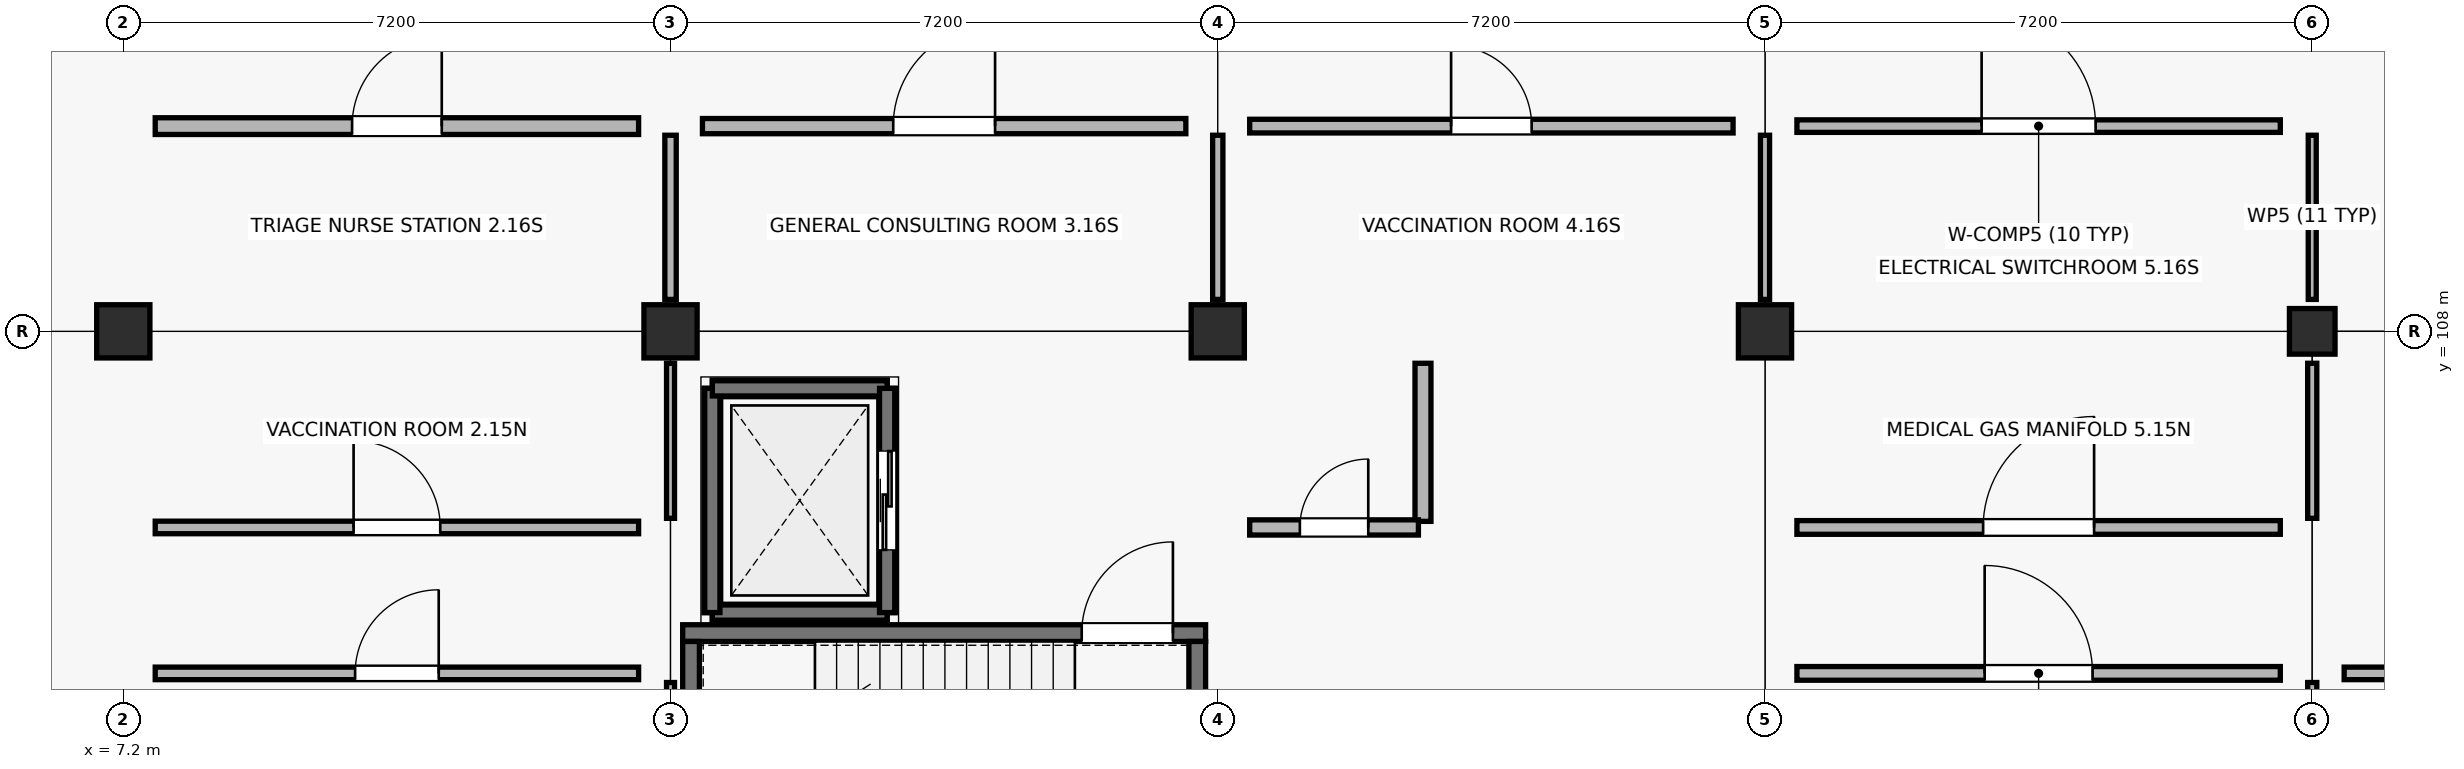
"""IFC4 building model, lengths in metres.
Left out: names, types, materials, properties, quantities, classifications, styles, units other than length and angle.
Written with IfcOpenShell. Run it as: python <this file> out.ifc"""

import sys

from ifc_helpers import new_model, si_unit, direction, frame, frame_2d, origin, origin_2d, place, context, subcontext, project, spatial, rectangle, extrude, element, fill, save


model = new_model("IFC4")
c1 = context("Model", 3, precision=1e-05, world=origin(), true_north=direction((0.0, 1.0)))
c2 = subcontext(c1, "Body", "Model", "MODEL_VIEW")
j1 = project(units=[si_unit("LENGTHUNIT", "METRE"), si_unit("PLANEANGLEUNIT", "RADIAN")], contexts=[c1])
p1 = place(None, origin())
s1 = spatial("IfcSite", under=j1, at=p1, CompositionType="ELEMENT")
p2 = place(p1, origin())
s2 = spatial("IfcBuilding", under=s1, at=p2, CompositionType="ELEMENT")
p3 = place(p2, origin())
s3 = spatial("IfcBuildingStorey", under=s2, at=p3, CompositionType="ELEMENT", Elevation=0.0)
for number, where, z_axis, x_axis in (
    (1, (7.2, 108.0, -0.25), (0.0, 0.0, 1.0), (1.0, 0.0, 0.0)),
    (2, (14.4, 108.0, -0.25), (0.0, 0.0, 1.0), (1.0, 0.0, 0.0)),
    (3, (21.6, 108.0, -0.25), (0.0, 0.0, 1.0), (1.0, 0.0, 0.0)),
    (4, (28.8, 108.0, -0.25), (0.0, 0.0, 1.0), (1.0, 0.0, 0.0)),
):
    element("IfcColumn", number, at=place(p3, frame(where, z_axis=z_axis, x_axis=x_axis)), inside=s3, PredefinedType="COLUMN", context=c2, shape_type="SweptSolid", body=[
        extrude(rectangle(XDim=0.7, YDim=0.7, at=origin_2d()), origin(), (0.0, 0.0, 1.0), 4.75),
    ])
p4 = place(p3, frame((36.0, 108.0, -0.25), z_axis=(0.0, 0.0, 1.0), x_axis=(1.0, 0.0, 0.0)))
e5 = element("IfcColumn", 5, at=p4, inside=s3, PredefinedType="COLUMN", context=c2, shape_type="SweptSolid", body=[
    extrude(rectangle(XDim=0.6, YDim=0.6, at=origin_2d()), origin(), (0.0, 0.0, 1.0), 4.75),
])
p5 = place(p3, frame((14.95, 104.3, -0.95), z_axis=(0.0, 0.0, 1.0), x_axis=(1.0, 0.0, 0.0)))
e6 = element("IfcWall", 6, at=p5, inside=s3, PredefinedType="SHEAR", context=c2, shape_type="SweptSolid", body=[
    extrude(rectangle(XDim=2.3, YDim=0.22, at=frame_2d((1.15, 0.0))), origin(), (0.0, 0.0, 1.0), 0.95),
])
p6 = place(p3, frame((17.25, 104.3, -0.95), z_axis=(0.0, 0.0, 1.0), x_axis=(0.0, 1.0, 0.0)))
e7 = element("IfcWall", 7, at=p6, inside=s3, PredefinedType="SHEAR", context=c2, shape_type="SweptSolid", body=[
    extrude(rectangle(XDim=2.95, YDim=0.22, at=frame_2d((1.475, 0.0))), origin(), (0.0, 0.0, 1.0), 0.95),
])
p7 = place(p3, frame((17.25, 107.25, -0.95), z_axis=(0.0, 0.0, 1.0), x_axis=(-1.0, 0.0, 0.0)))
e8 = element("IfcWall", 8, at=p7, inside=s3, PredefinedType="SHEAR", context=c2, shape_type="SweptSolid", body=[
    extrude(rectangle(XDim=2.3, YDim=0.22, at=frame_2d((1.15, 0.0))), origin(), (0.0, 0.0, 1.0), 0.95),
])
p8 = place(p3, frame((14.95, 107.25, -0.95), z_axis=(0.0, 0.0, 1.0), x_axis=(0.0, -1.0, 0.0)))
e9 = element("IfcWall", 9, at=p8, inside=s3, PredefinedType="SHEAR", context=c2, shape_type="SweptSolid", body=[
    extrude(rectangle(XDim=2.95, YDim=0.22, at=frame_2d((1.475, 0.0))), origin(), (0.0, 0.0, 1.0), 0.95),
])
p9 = place(p3, frame((14.56, 104.03, -0.25), z_axis=(0.0, 0.0, 1.0), x_axis=(1.0, 0.0, 0.0)))
e10 = element("IfcWall", 10, at=p9, inside=s3, PredefinedType="SHEAR", context=c2, shape_type="SweptSolid", body=[
    extrude(rectangle(XDim=6.88, YDim=0.22, at=frame_2d((3.44, 0.0))), origin(), (0.0, 0.0, 1.0), 4.47),
])
p10 = place(p9, frame((5.25, 0.0, 0.25)))
e11 = element("IfcOpeningElement", 11, at=p10, cuts=e10, PredefinedType="OPENING", context=c2, shape_type="SweptSolid", body=[
    extrude(rectangle(XDim=1.2, YDim=2.15, at=frame_2d((0.6, 1.075))), frame((0.0, 0.12, 0.0), z_axis=(0.0, -1.0, 0.0), x_axis=(1.0, 0.0, 0.0)), (0.0, 0.0, 1.0), 0.24),
])
for number, where, z_axis, x_axis in (
    (12, (14.67, 100.92, -0.25), (0.0, 0.0, 1.0), (0.0, 1.0, 0.0)),
    (13, (21.33, 100.92, -0.25), (0.0, 0.0, 1.0), (0.0, 1.0, 0.0)),
):
    element("IfcWall", number, at=place(p3, frame(where, z_axis=z_axis, x_axis=x_axis)), inside=s3, PredefinedType="SHEAR", context=c2, shape_type="SweptSolid", body=[
        extrude(rectangle(XDim=3.0, YDim=0.22, at=frame_2d((1.5, 0.0))), origin(), (0.0, 0.0, 1.0), 4.47),
    ])
p11 = place(p3, frame((14.95, 104.3, 0.0), z_axis=(0.0, 0.0, 1.0), x_axis=(1.0, 0.0, 0.0)))
e14 = element("IfcWall", 14, at=p11, inside=s3, PredefinedType="SHEAR", context=c2, shape_type="SweptSolid", body=[
    extrude(rectangle(XDim=2.3, YDim=0.2, at=frame_2d((1.15, 0.0))), origin(), (0.0, 0.0, 1.0), 4.22),
])
p12 = place(p3, frame((14.95, 104.3, 0.0), z_axis=(0.0, 0.0, 1.0), x_axis=(0.0, 1.0, 0.0)))
e15 = element("IfcWall", 15, at=p12, inside=s3, PredefinedType="SHEAR", context=c2, shape_type="SweptSolid", body=[
    extrude(rectangle(XDim=2.95, YDim=0.2, at=frame_2d((1.475, 0.0))), origin(), (0.0, 0.0, 1.0), 4.22),
])
p13 = place(p3, frame((14.95, 107.25, 0.0), z_axis=(0.0, 0.0, 1.0), x_axis=(1.0, 0.0, 0.0)))
e16 = element("IfcWall", 16, at=p13, inside=s3, PredefinedType="SHEAR", context=c2, shape_type="SweptSolid", body=[
    extrude(rectangle(XDim=2.3, YDim=0.2, at=frame_2d((1.15, 0.0))), origin(), (0.0, 0.0, 1.0), 4.22),
])
p14 = place(p3, frame((17.25, 104.3, 0.0), z_axis=(0.0, 0.0, 1.0), x_axis=(0.0, 1.0, 0.0)))
e17 = element("IfcWall", 17, at=p14, inside=s3, PredefinedType="SHEAR", context=c2, shape_type="SweptSolid", body=[
    extrude(rectangle(XDim=2.95, YDim=0.2, at=frame_2d((1.475, 0.0))), origin(), (0.0, 0.0, 1.0), 4.22),
])
p15 = place(p14, frame((0.825, 0.0, 0.0)))
e18 = element("IfcOpeningElement", 18, at=p15, cuts=e17, PredefinedType="OPENING", context=c2, shape_type="SweptSolid", body=[
    extrude(rectangle(XDim=1.3, YDim=2.15, at=frame_2d((0.65, 1.075))), frame((0.0, 0.11, 0.0), z_axis=(0.0, -1.0, 0.0), x_axis=(1.0, 0.0, 0.0)), (0.0, 0.0, 1.0), 0.22),
])
p16 = place(p3, frame((29.22, 103.5, 0.0), z_axis=(0.0, 0.0, 1.0), x_axis=(1.0, 0.0, 0.0)))
e19 = element("IfcWall", 19, at=p16, inside=s3, PredefinedType="PARTITIONING", context=c2, shape_type="SweptSolid", body=[
    extrude(rectangle(XDim=6.36, YDim=0.18, at=frame_2d((3.18, 0.0))), origin(), (0.0, 0.0, 1.0), 3.36),
])
p17 = place(p16, frame((2.47, 0.0, 0.0)))
e20 = element("IfcOpeningElement", 20, at=p17, cuts=e19, PredefinedType="OPENING", context=c2, shape_type="SweptSolid", body=[
    extrude(rectangle(XDim=1.42, YDim=2.09, at=frame_2d((0.71, 1.045))), frame((0.0, 0.1, 0.0), z_axis=(0.0, -1.0, 0.0), x_axis=(1.0, 0.0, 0.0)), (0.0, 0.0, 1.0), 0.2),
])
p18 = place(p3, frame((36.0, 101.22, 0.0), z_axis=(0.0, 0.0, 1.0), x_axis=(0.0, 1.0, 0.0)))
e21 = element("IfcWall", 21, at=p18, inside=s3, PredefinedType="PARTITIONING", context=c2, shape_type="SweptSolid", body=[
    extrude(rectangle(XDim=2.16, YDim=0.12, at=frame_2d((1.08, 0.0))), origin(), (0.0, 0.0, 1.0), 3.36),
])
p19 = place(p3, frame((29.22, 105.42, 0.0), z_axis=(0.0, 0.0, 1.0), x_axis=(1.0, 0.0, 0.0)))
e22 = element("IfcWall", 22, at=p19, inside=s3, PredefinedType="PARTITIONING", context=c2, shape_type="SweptSolid", body=[
    extrude(rectangle(XDim=6.36, YDim=0.18, at=frame_2d((3.18, 0.0))), origin(), (0.0, 0.0, 1.0), 3.36),
])
p20 = place(p19, frame((2.45, 0.0, 0.0)))
e23 = element("IfcOpeningElement", 23, at=p20, cuts=e22, PredefinedType="OPENING", context=c2, shape_type="SweptSolid", body=[
    extrude(rectangle(XDim=1.46, YDim=2.09, at=frame_2d((0.73, 1.045))), frame((0.0, 0.1, 0.0), z_axis=(0.0, -1.0, 0.0), x_axis=(1.0, 0.0, 0.0)), (0.0, 0.0, 1.0), 0.2),
])
p21 = place(p3, frame((36.0, 105.54, 0.0), z_axis=(0.0, 0.0, 1.0), x_axis=(0.0, 1.0, 0.0)))
e24 = element("IfcWall", 24, at=p21, inside=s3, PredefinedType="PARTITIONING", context=c2, shape_type="SweptSolid", body=[
    extrude(rectangle(XDim=2.04, YDim=0.12, at=frame_2d((1.02, 0.0))), origin(), (0.0, 0.0, 1.0), 3.36),
])
p22 = place(p3, frame((29.22, 110.7, 0.0), z_axis=(0.0, 0.0, 1.0), x_axis=(1.0, 0.0, 0.0)))
e25 = element("IfcWall", 25, at=p22, inside=s3, PredefinedType="PARTITIONING", context=c2, shape_type="SweptSolid", body=[
    extrude(rectangle(XDim=6.36, YDim=0.165, at=frame_2d((3.18, 0.0))), origin(), (0.0, 0.0, 1.0), 3.36),
])
p23 = place(p22, frame((2.43, 0.0, 0.0)))
e26 = element("IfcOpeningElement", 26, at=p23, cuts=e25, PredefinedType="OPENING", context=c2, shape_type="SweptSolid", body=[
    extrude(rectangle(XDim=1.5, YDim=2.09, at=frame_2d((0.75, 1.045))), frame((0.0, 0.093, 0.0), z_axis=(0.0, -1.0, 0.0), x_axis=(1.0, 0.0, 0.0)), (0.0, 0.0, 1.0), 0.185),
])
p24 = place(p3, frame((36.0, 108.42, 0.0), z_axis=(0.0, 0.0, 1.0), x_axis=(0.0, 1.0, 0.0)))
e27 = element("IfcWall", 27, at=p24, inside=s3, PredefinedType="PARTITIONING", context=c2, shape_type="SweptSolid", body=[
    extrude(rectangle(XDim=2.16, YDim=0.105, at=frame_2d((1.08, 0.0))), origin(), (0.0, 0.0, 1.0), 3.36),
])
p25 = place(p3, frame((36.42, 103.5, 0.0), z_axis=(0.0, 0.0, 1.0), x_axis=(1.0, 0.0, 0.0)))
e28 = element("IfcWall", 28, at=p25, inside=s3, PredefinedType="PARTITIONING", context=c2, shape_type="SweptSolid", body=[
    extrude(rectangle(XDim=6.36, YDim=0.165, at=frame_2d((3.18, 0.0))), origin(), (0.0, 0.0, 1.0), 3.36),
])
p26 = place(p25, frame((2.63, 0.0, 0.0)))
e29 = element("IfcOpeningElement", 29, at=p26, cuts=e28, PredefinedType="OPENING", context=c2, shape_type="SweptSolid", body=[
    extrude(rectangle(XDim=1.1, YDim=2.14, at=frame_2d((0.55, 1.07))), frame((0.0, 0.093, 0.0), z_axis=(0.0, -1.0, 0.0), x_axis=(1.0, 0.0, 0.0)), (0.0, 0.0, 1.0), 0.185),
])
p27 = place(p3, frame((7.62, 103.5, 0.0), z_axis=(0.0, 0.0, 1.0), x_axis=(1.0, 0.0, 0.0)))
e30 = element("IfcWall", 30, at=p27, inside=s3, PredefinedType="PARTITIONING", context=c2, shape_type="SweptSolid", body=[
    extrude(rectangle(XDim=6.36, YDim=0.165, at=frame_2d((3.18, 0.0))), origin(), (0.0, 0.0, 1.0), 3.36),
])
p28 = place(p27, frame((2.63, 0.0, 0.0)))
e31 = element("IfcOpeningElement", 31, at=p28, cuts=e30, PredefinedType="OPENING", context=c2, shape_type="SweptSolid", body=[
    extrude(rectangle(XDim=1.1, YDim=2.09, at=frame_2d((0.55, 1.045))), frame((0.0, 0.093, 0.0), z_axis=(0.0, -1.0, 0.0), x_axis=(1.0, 0.0, 0.0)), (0.0, 0.0, 1.0), 0.185),
])
p29 = place(p3, frame((14.4, 101.22, 0.0), z_axis=(0.0, 0.0, 1.0), x_axis=(0.0, 1.0, 0.0)))
e32 = element("IfcWall", 32, at=p29, inside=s3, PredefinedType="PARTITIONING", context=c2, shape_type="SweptSolid", body=[
    extrude(rectangle(XDim=2.16, YDim=0.105, at=frame_2d((1.08, 0.0))), origin(), (0.0, 0.0, 1.0), 3.36),
])
p30 = place(p3, frame((7.62, 105.42, 0.0), z_axis=(0.0, 0.0, 1.0), x_axis=(1.0, 0.0, 0.0)))
e33 = element("IfcWall", 33, at=p30, inside=s3, PredefinedType="PARTITIONING", context=c2, shape_type="SweptSolid", body=[
    extrude(rectangle(XDim=6.36, YDim=0.165, at=frame_2d((3.18, 0.0))), origin(), (0.0, 0.0, 1.0), 3.36),
])
p31 = place(p30, frame((2.61, 0.0, 0.0)))
e34 = element("IfcOpeningElement", 34, at=p31, cuts=e33, PredefinedType="OPENING", context=c2, shape_type="SweptSolid", body=[
    extrude(rectangle(XDim=1.14, YDim=2.09, at=frame_2d((0.57, 1.045))), frame((0.0, 0.093, 0.0), z_axis=(0.0, -1.0, 0.0), x_axis=(1.0, 0.0, 0.0)), (0.0, 0.0, 1.0), 0.185),
])
p32 = place(p3, frame((14.4, 105.54, 0.0), z_axis=(0.0, 0.0, 1.0), x_axis=(0.0, 1.0, 0.0)))
e35 = element("IfcWall", 35, at=p32, inside=s3, PredefinedType="PARTITIONING", context=c2, shape_type="SweptSolid", body=[
    extrude(rectangle(XDim=2.04, YDim=0.105, at=frame_2d((1.02, 0.0))), origin(), (0.0, 0.0, 1.0), 3.36),
])
p33 = place(p3, frame((7.62, 110.7, 0.0), z_axis=(0.0, 0.0, 1.0), x_axis=(1.0, 0.0, 0.0)))
e36 = element("IfcWall", 36, at=p33, inside=s3, PredefinedType="SOLIDWALL", context=c2, shape_type="SweptSolid", body=[
    extrude(rectangle(XDim=6.36, YDim=0.22, at=frame_2d((3.18, 0.0))), origin(), (0.0, 0.0, 1.0), 3.36),
])
p34 = place(p33, frame((2.59, 0.0, 0.0)))
e37 = element("IfcOpeningElement", 37, at=p34, cuts=e36, PredefinedType="OPENING", context=c2, shape_type="SweptSolid", body=[
    extrude(rectangle(XDim=1.18, YDim=2.09, at=frame_2d((0.59, 1.045))), frame((0.0, 0.12, 0.0), z_axis=(0.0, -1.0, 0.0), x_axis=(1.0, 0.0, 0.0)), (0.0, 0.0, 1.0), 0.24),
])
p35 = place(p3, frame((14.4, 108.42, 0.0), z_axis=(0.0, 0.0, 1.0), x_axis=(0.0, 1.0, 0.0)))
e38 = element("IfcWall", 38, at=p35, inside=s3, PredefinedType="PARTITIONING", context=c2, shape_type="SweptSolid", body=[
    extrude(rectangle(XDim=2.16, YDim=0.15, at=frame_2d((1.08, 0.0))), origin(), (0.0, 0.0, 1.0), 3.36),
])
p36 = place(p3, frame((14.82, 110.7, 0.0), z_axis=(0.0, 0.0, 1.0), x_axis=(1.0, 0.0, 0.0)))
e39 = element("IfcWall", 39, at=p36, inside=s3, PredefinedType="SOLIDWALL", context=c2, shape_type="SweptSolid", body=[
    extrude(rectangle(XDim=6.36, YDim=0.2, at=frame_2d((3.18, 0.0))), origin(), (0.0, 0.0, 1.0), 3.36),
])
p37 = place(p36, frame((2.51, 0.0, 0.0)))
e40 = element("IfcOpeningElement", 40, at=p37, cuts=e39, PredefinedType="OPENING", context=c2, shape_type="SweptSolid", body=[
    extrude(rectangle(XDim=1.34, YDim=2.09, at=frame_2d((0.67, 1.045))), frame((0.0, 0.11, 0.0), z_axis=(0.0, -1.0, 0.0), x_axis=(1.0, 0.0, 0.0)), (0.0, 0.0, 1.0), 0.22),
])
p38 = place(p3, frame((21.6, 108.42, 0.0), z_axis=(0.0, 0.0, 1.0), x_axis=(0.0, 1.0, 0.0)))
e41 = element("IfcWall", 41, at=p38, inside=s3, PredefinedType="PARTITIONING", context=c2, shape_type="SweptSolid", body=[
    extrude(rectangle(XDim=2.16, YDim=0.135, at=frame_2d((1.08, 0.0))), origin(), (0.0, 0.0, 1.0), 3.36),
])
p39 = place(p3, frame((24.3, 105.5, 0.0), z_axis=(0.0, 0.0, 1.0), x_axis=(0.0, 1.0, 0.0)))
e42 = element("IfcWall", 42, at=p39, inside=s3, PredefinedType="PLUMBINGWALL", context=c2, shape_type="SweptSolid", body=[
    extrude(rectangle(XDim=2.08, YDim=0.21, at=frame_2d((1.04, 0.0))), origin(), (0.0, 0.0, 1.0), 3.36),
])
p40 = place(p3, frame((22.02, 105.42, 0.0), z_axis=(0.0, 0.0, 1.0), x_axis=(1.0, 0.0, 0.0)))
e43 = element("IfcWall", 43, at=p40, inside=s3, PredefinedType="SOLIDWALL", context=c2, shape_type="SweptSolid", body=[
    extrude(rectangle(XDim=2.22, YDim=0.2, at=frame_2d((1.11, 0.0))), origin(), (0.0, 0.0, 1.0), 3.36),
])
p41 = place(p40, frame((0.66, 0.0, 0.0)))
e44 = element("IfcOpeningElement", 44, at=p41, cuts=e43, PredefinedType="OPENING", context=c2, shape_type="SweptSolid", body=[
    extrude(rectangle(XDim=0.9, YDim=2.04, at=frame_2d((0.45, 1.02))), frame((0.0, 0.11, 0.0), z_axis=(0.0, -1.0, 0.0), x_axis=(1.0, 0.0, 0.0)), (0.0, 0.0, 1.0), 0.22),
])
p42 = place(p3, frame((22.02, 110.7, 0.0), z_axis=(0.0, 0.0, 1.0), x_axis=(1.0, 0.0, 0.0)))
e45 = element("IfcWall", 45, at=p42, inside=s3, PredefinedType="PARTITIONING", context=c2, shape_type="SweptSolid", body=[
    extrude(rectangle(XDim=6.36, YDim=0.18, at=frame_2d((3.18, 0.0))), origin(), (0.0, 0.0, 1.0), 3.36),
])
p43 = place(p42, frame((2.65, 0.0, 0.0)))
e46 = element("IfcOpeningElement", 46, at=p43, cuts=e45, PredefinedType="OPENING", context=c2, shape_type="SweptSolid", body=[
    extrude(rectangle(XDim=1.06, YDim=2.14, at=frame_2d((0.53, 1.07))), frame((0.0, 0.1, 0.0), z_axis=(0.0, -1.0, 0.0), x_axis=(1.0, 0.0, 0.0)), (0.0, 0.0, 1.0), 0.2),
])
p44 = place(p3, frame((28.8, 108.42, 0.0), z_axis=(0.0, 0.0, 1.0), x_axis=(0.0, 1.0, 0.0)))
e47 = element("IfcWall", 47, at=p44, inside=s3, PredefinedType="PARTITIONING", context=c2, shape_type="SweptSolid", body=[
    extrude(rectangle(XDim=2.16, YDim=0.12, at=frame_2d((1.08, 0.0))), origin(), (0.0, 0.0, 1.0), 3.36),
])
p45 = place(p10, origin())
e48 = element("IfcDoor", 48, at=p45, inside=s3, OperationType="SINGLE_SWING_RIGHT", PredefinedType="DOOR", context=c2, shape_type="SweptSolid", body=[
    extrude(rectangle(XDim=1.2, YDim=2.15, at=frame_2d((0.6, 1.075))), frame((0.0, 0.025, 0.0), z_axis=(0.0, -1.0, 0.0), x_axis=(1.0, 0.0, 0.0)), (0.0, 0.0, 1.0), 0.05),
])
fill(e11, e48)
p46 = place(p15, origin())
e49 = element("IfcDoor", 49, at=p46, inside=s3, OperationType="SLIDING_TO_LEFT", PredefinedType="DOOR", context=c2, shape_type="SweptSolid", body=[
    extrude(rectangle(XDim=1.3, YDim=2.15, at=frame_2d((0.65, 1.075))), frame((0.0, 0.025, 0.0), z_axis=(0.0, -1.0, 0.0), x_axis=(1.0, 0.0, 0.0)), (0.0, 0.0, 1.0), 0.05),
])
fill(e18, e49)
p47 = place(p17, origin())
e50 = element("IfcDoor", 50, at=p47, inside=s3, OperationType="SINGLE_SWING_LEFT", PredefinedType="DOOR", context=c2, shape_type="SweptSolid", body=[
    extrude(rectangle(XDim=1.42, YDim=2.09, at=frame_2d((0.71, 1.045))), frame((0.0, 0.025, 0.0), z_axis=(0.0, -1.0, 0.0), x_axis=(1.0, 0.0, 0.0)), (0.0, 0.0, 1.0), 0.05),
])
fill(e20, e50)
p48 = place(p20, origin())
e51 = element("IfcDoor", 51, at=p48, inside=s3, OperationType="SINGLE_SWING_RIGHT", PredefinedType="DOOR", context=c2, shape_type="SweptSolid", body=[
    extrude(rectangle(XDim=1.46, YDim=2.09, at=frame_2d((0.73, 1.045))), frame((0.0, 0.025, 0.0), z_axis=(0.0, -1.0, 0.0), x_axis=(1.0, 0.0, 0.0)), (0.0, 0.0, 1.0), 0.05),
])
fill(e23, e51)
p49 = place(p23, origin())
e52 = element("IfcDoor", 52, at=p49, inside=s3, OperationType="SINGLE_SWING_LEFT", PredefinedType="DOOR", context=c2, shape_type="SweptSolid", body=[
    extrude(rectangle(XDim=1.5, YDim=2.09, at=frame_2d((0.75, 1.045))), frame((0.0, 0.025, 0.0), z_axis=(0.0, -1.0, 0.0), x_axis=(1.0, 0.0, 0.0)), (0.0, 0.0, 1.0), 0.05),
])
fill(e26, e52)
p50 = place(p28, origin())
e53 = element("IfcDoor", 53, at=p50, inside=s3, OperationType="SINGLE_SWING_RIGHT", PredefinedType="DOOR", context=c2, shape_type="SweptSolid", body=[
    extrude(rectangle(XDim=1.1, YDim=2.09, at=frame_2d((0.55, 1.045))), frame((0.0, 0.025, 0.0), z_axis=(0.0, -1.0, 0.0), x_axis=(1.0, 0.0, 0.0)), (0.0, 0.0, 1.0), 0.05),
])
fill(e31, e53)
p51 = place(p31, origin())
e54 = element("IfcDoor", 54, at=p51, inside=s3, OperationType="SINGLE_SWING_LEFT", PredefinedType="DOOR", context=c2, shape_type="SweptSolid", body=[
    extrude(rectangle(XDim=1.14, YDim=2.09, at=frame_2d((0.57, 1.045))), frame((0.0, 0.025, 0.0), z_axis=(0.0, -1.0, 0.0), x_axis=(1.0, 0.0, 0.0)), (0.0, 0.0, 1.0), 0.05),
])
fill(e34, e54)
p52 = place(p34, origin())
e55 = element("IfcDoor", 55, at=p52, inside=s3, OperationType="SINGLE_SWING_RIGHT", PredefinedType="DOOR", context=c2, shape_type="SweptSolid", body=[
    extrude(rectangle(XDim=1.18, YDim=2.09, at=frame_2d((0.59, 1.045))), frame((0.0, 0.025, 0.0), z_axis=(0.0, -1.0, 0.0), x_axis=(1.0, 0.0, 0.0)), (0.0, 0.0, 1.0), 0.05),
])
fill(e37, e55)
p53 = place(p37, origin())
e56 = element("IfcDoor", 56, at=p53, inside=s3, OperationType="SINGLE_SWING_RIGHT", PredefinedType="DOOR", context=c2, shape_type="SweptSolid", body=[
    extrude(rectangle(XDim=1.34, YDim=2.09, at=frame_2d((0.67, 1.045))), frame((0.0, 0.025, 0.0), z_axis=(0.0, -1.0, 0.0), x_axis=(1.0, 0.0, 0.0)), (0.0, 0.0, 1.0), 0.05),
])
fill(e40, e56)
p54 = place(p41, origin())
e57 = element("IfcDoor", 57, at=p54, inside=s3, OperationType="SINGLE_SWING_RIGHT", PredefinedType="DOOR", context=c2, shape_type="SweptSolid", body=[
    extrude(rectangle(XDim=0.9, YDim=2.04, at=frame_2d((0.45, 1.02))), frame((0.0, 0.025, 0.0), z_axis=(0.0, -1.0, 0.0), x_axis=(1.0, 0.0, 0.0)), (0.0, 0.0, 1.0), 0.05),
])
fill(e44, e57)
p55 = place(p43, origin())
e58 = element("IfcDoor", 58, at=p55, inside=s3, OperationType="SINGLE_SWING_LEFT", PredefinedType="DOOR", context=c2, shape_type="SweptSolid", body=[
    extrude(rectangle(XDim=1.06, YDim=2.14, at=frame_2d((0.53, 1.07))), frame((0.0, 0.025, 0.0), z_axis=(0.0, -1.0, 0.0), x_axis=(1.0, 0.0, 0.0)), (0.0, 0.0, 1.0), 0.05),
])
fill(e46, e58)
save(model, sys.argv[1])
